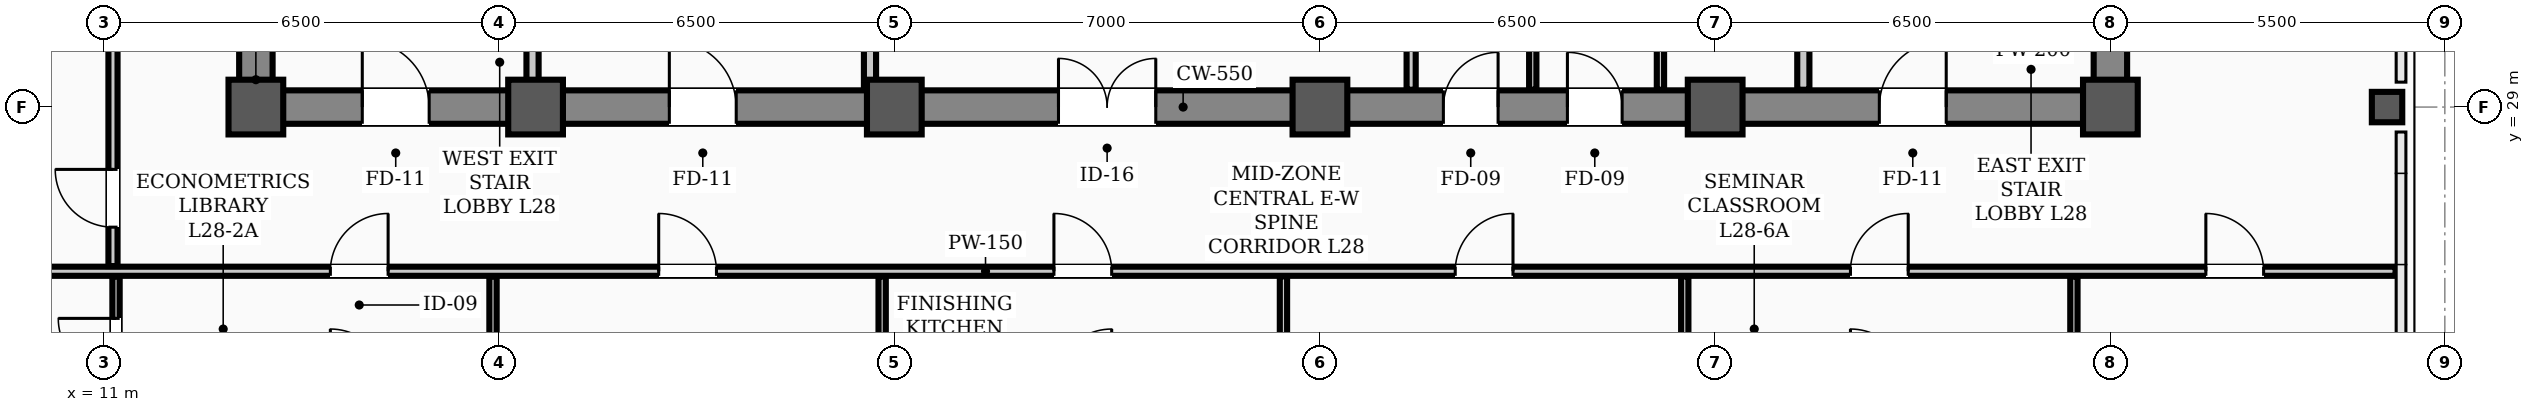
"""IFC4 building model, lengths in metres.
Left out: names, types, materials, properties, quantities, classifications, styles, units other than length and angle.
Written with IfcOpenShell. Run it as: python <this file> out.ifc"""

import sys

from ifc_helpers import new_model, si_unit, direction, frame, frame_2d, origin, origin_2d, place, context, subcontext, project, spatial, rectangle, hollow_rectangle, extrude, element, fill, save


model = new_model("IFC4")
c1 = context("Model", 3, precision=1e-05, world=origin(), true_north=direction((0.0, 1.0)))
c2 = subcontext(c1, "Body", "Model", "MODEL_VIEW")
j1 = project(units=[si_unit("LENGTHUNIT", "METRE"), si_unit("PLANEANGLEUNIT", "RADIAN")], contexts=[c1])
p1 = place(None, origin())
s1 = spatial("IfcSite", under=j1, at=p1, CompositionType="ELEMENT")
p2 = place(p1, origin())
s2 = spatial("IfcBuilding", under=s1, at=p2, CompositionType="ELEMENT")
p3 = place(p2, frame((0.0, 0.0, 114.9)))
s3 = spatial("IfcBuildingStorey", under=s2, at=p3, CompositionType="ELEMENT", Elevation=114.9)
for number, where, z_axis, x_axis in (
    (1, (13.5, 29.0, 0.0), (0.0, 0.0, 1.0), (1.0, 0.0, 0.0)),
    (2, (18.1, 29.0, 0.0), (0.0, 0.0, 1.0), (1.0, 0.0, 0.0)),
    (3, (24.0, 29.0, 0.0), (0.0, 0.0, 1.0), (1.0, 0.0, 0.0)),
    (4, (31.0, 29.0, 0.0), (0.0, 0.0, 1.0), (1.0, 0.0, 0.0)),
    (5, (37.5, 29.0, 0.0), (0.0, 0.0, 1.0), (1.0, 0.0, 0.0)),
    (6, (44.0, 29.0, 0.0), (0.0, 0.0, 1.0), (1.0, 0.0, 0.0)),
):
    element("IfcColumn", number, at=place(p3, frame(where, z_axis=z_axis, x_axis=x_axis)), inside=s3, PredefinedType="COLUMN", context=c2, shape_type="SweptSolid", body=[
        extrude(hollow_rectangle(XDim=0.9, YDim=0.9, WallThickness=0.035, InnerFilletRadius=0.017, OuterFilletRadius=0.052, at=origin_2d()), origin(), (0.0, 0.0, 1.0), 3.9),
    ])
p4 = place(p3, frame((48.55, 29.0, 0.0), z_axis=(0.0, 0.0, 1.0), x_axis=(1.0, 0.0, 0.0)))
e7 = element("IfcColumn", 7, at=p4, inside=s3, PredefinedType="COLUMN", context=c2, shape_type="SweptSolid", body=[
    extrude(hollow_rectangle(XDim=0.5, YDim=0.5, WallThickness=0.024, InnerFilletRadius=0.012, OuterFilletRadius=0.036, at=origin_2d()), origin(), (0.0, 0.0, 1.0), 3.9),
])
p5 = place(p3, frame((13.5, 29.0, 0.0), z_axis=(0.0, 0.0, 1.0), x_axis=(1.0, 0.0, 0.0)))
e8 = element("IfcWall", 8, at=p5, inside=s3, PredefinedType="SHEAR", context=c2, shape_type="SweptSolid", body=[
    extrude(rectangle(XDim=30.5, YDim=0.55, at=frame_2d((15.25, 0.0))), origin(), (0.0, 0.0, 1.0), 3.72),
])
p6 = place(p5, frame((1.75, 0.0, 0.0)))
e9 = element("IfcOpeningElement", 9, at=p6, cuts=e8, PredefinedType="OPENING", context=c2, shape_type="SweptSolid", body=[
    extrude(rectangle(XDim=1.1, YDim=2.08, at=frame_2d((0.55, 1.04))), frame((0.0, 0.285, 0.0), z_axis=(0.0, -1.0, 0.0), x_axis=(1.0, 0.0, 0.0)), (0.0, 0.0, 1.0), 0.57),
])
p7 = place(p5, frame((26.7, 0.0, 0.0)))
e10 = element("IfcOpeningElement", 10, at=p7, cuts=e8, PredefinedType="OPENING", context=c2, shape_type="SweptSolid", body=[
    extrude(rectangle(XDim=1.1, YDim=2.08, at=frame_2d((0.55, 1.04))), frame((0.0, 0.285, 0.0), z_axis=(0.0, -1.0, 0.0), x_axis=(1.0, 0.0, 0.0)), (0.0, 0.0, 1.0), 0.57),
])
p8 = place(p5, frame((6.8, 0.0, 0.0)))
e11 = element("IfcOpeningElement", 11, at=p8, cuts=e8, PredefinedType="OPENING", context=c2, shape_type="SweptSolid", body=[
    extrude(rectangle(XDim=1.1, YDim=2.08, at=frame_2d((0.55, 1.04))), frame((0.0, 0.285, 0.0), z_axis=(0.0, -1.0, 0.0), x_axis=(1.0, 0.0, 0.0)), (0.0, 0.0, 1.0), 0.57),
])
p9 = place(p5, frame((13.2, 0.0, 0.0)))
e12 = element("IfcOpeningElement", 12, at=p9, cuts=e8, PredefinedType="OPENING", context=c2, shape_type="SweptSolid", body=[
    extrude(rectangle(XDim=1.6, YDim=2.08, at=frame_2d((0.8, 1.04))), frame((0.0, 0.285, 0.0), z_axis=(0.0, -1.0, 0.0), x_axis=(1.0, 0.0, 0.0)), (0.0, 0.0, 1.0), 0.57),
])
p10 = place(p5, frame((19.53, 0.0, 0.0)))
e13 = element("IfcOpeningElement", 13, at=p10, cuts=e8, PredefinedType="OPENING", context=c2, shape_type="SweptSolid", body=[
    extrude(rectangle(XDim=0.9, YDim=2.08, at=frame_2d((0.45, 1.04))), frame((0.0, 0.285, 0.0), z_axis=(0.0, -1.0, 0.0), x_axis=(1.0, 0.0, 0.0)), (0.0, 0.0, 1.0), 0.57),
])
p11 = place(p5, frame((21.57, 0.0, 0.0)))
e14 = element("IfcOpeningElement", 14, at=p11, cuts=e8, PredefinedType="OPENING", context=c2, shape_type="SweptSolid", body=[
    extrude(rectangle(XDim=0.9, YDim=2.08, at=frame_2d((0.45, 1.04))), frame((0.0, 0.285, 0.0), z_axis=(0.0, -1.0, 0.0), x_axis=(1.0, 0.0, 0.0)), (0.0, 0.0, 1.0), 0.57),
])
for number, where, z_axis, x_axis in (
    (15, (13.5, 29.35, 0.0), (0.0, 0.0, 1.0), (0.0, 1.0, 0.0)),
    (16, (44.0, 29.35, 0.0), (0.0, 0.0, 1.0), (0.0, 1.0, 0.0)),
):
    element("IfcWall", number, at=place(p3, frame(where, z_axis=z_axis, x_axis=x_axis)), inside=s3, PredefinedType="SHEAR", context=c2, shape_type="SweptSolid", body=[
        extrude(rectangle(XDim=8.6, YDim=0.55, at=frame_2d((4.3, 0.0))), origin(), (0.0, 0.0, 1.0), 3.72),
    ])
p12 = place(p3, frame((2.31, 26.3, 0.0), z_axis=(0.0, 0.0, 1.0), x_axis=(1.0, 0.0, 0.0)))
e17 = element("IfcWall", 17, at=p12, inside=s3, PredefinedType="PARTITIONING", context=c2, shape_type="SweptSolid", body=[
    extrude(rectangle(XDim=46.38, YDim=0.15, at=frame_2d((23.19, 0.0))), origin(), (0.0, 0.0, 1.0), 3.1),
])
p13 = place(p12, frame((12.415, 0.0, 0.0)))
e18 = element("IfcOpeningElement", 18, at=p13, cuts=e17, PredefinedType="OPENING", context=c2, shape_type="SweptSolid", body=[
    extrude(rectangle(XDim=0.95, YDim=2.08, at=frame_2d((0.475, 1.04))), frame((0.0, 0.085, 0.0), z_axis=(0.0, -1.0, 0.0), x_axis=(1.0, 0.0, 0.0)), (0.0, 0.0, 1.0), 0.17),
])
p14 = place(p12, frame((17.815, 0.0, 0.0)))
e19 = element("IfcOpeningElement", 19, at=p14, cuts=e17, PredefinedType="OPENING", context=c2, shape_type="SweptSolid", body=[
    extrude(rectangle(XDim=0.95, YDim=2.08, at=frame_2d((0.475, 1.04))), frame((0.0, 0.085, 0.0), z_axis=(0.0, -1.0, 0.0), x_axis=(1.0, 0.0, 0.0)), (0.0, 0.0, 1.0), 0.17),
])
p15 = place(p12, frame((24.315, 0.0, 0.0)))
e20 = element("IfcOpeningElement", 20, at=p15, cuts=e17, PredefinedType="OPENING", context=c2, shape_type="SweptSolid", body=[
    extrude(rectangle(XDim=0.95, YDim=2.08, at=frame_2d((0.475, 1.04))), frame((0.0, 0.085, 0.0), z_axis=(0.0, -1.0, 0.0), x_axis=(1.0, 0.0, 0.0)), (0.0, 0.0, 1.0), 0.17),
])
p16 = place(p12, frame((30.915, 0.0, 0.0)))
e21 = element("IfcOpeningElement", 21, at=p16, cuts=e17, PredefinedType="OPENING", context=c2, shape_type="SweptSolid", body=[
    extrude(rectangle(XDim=0.95, YDim=2.08, at=frame_2d((0.475, 1.04))), frame((0.0, 0.085, 0.0), z_axis=(0.0, -1.0, 0.0), x_axis=(1.0, 0.0, 0.0)), (0.0, 0.0, 1.0), 0.17),
])
p17 = place(p12, frame((37.415, 0.0, 0.0)))
e22 = element("IfcOpeningElement", 22, at=p17, cuts=e17, PredefinedType="OPENING", context=c2, shape_type="SweptSolid", body=[
    extrude(rectangle(XDim=0.95, YDim=2.08, at=frame_2d((0.475, 1.04))), frame((0.0, 0.085, 0.0), z_axis=(0.0, -1.0, 0.0), x_axis=(1.0, 0.0, 0.0)), (0.0, 0.0, 1.0), 0.17),
])
p18 = place(p12, frame((43.26, 0.0, 0.0)))
e23 = element("IfcOpeningElement", 23, at=p18, cuts=e17, PredefinedType="OPENING", context=c2, shape_type="SweptSolid", body=[
    extrude(rectangle(XDim=0.95, YDim=2.08, at=frame_2d((0.475, 1.04))), frame((0.0, 0.085, 0.0), z_axis=(0.0, -1.0, 0.0), x_axis=(1.0, 0.0, 0.0)), (0.0, 0.0, 1.0), 0.17),
])
for number, where, z_axis, x_axis in (
    (24, (18.05, 29.285, 0.0), (0.0, 0.0, 1.0), (0.0, 1.0, 0.0)),
    (25, (38.95, 29.285, 0.0), (0.0, 0.0, 1.0), (0.0, 1.0, 0.0)),
):
    element("IfcWall", number, at=place(p3, frame(where, z_axis=z_axis, x_axis=x_axis)), inside=s3, PredefinedType="STANDARD", context=c2, shape_type="SweptSolid", body=[
        extrude(rectangle(XDim=1.015, YDim=0.2, at=frame_2d((0.508, 0.0))), origin(), (0.0, 0.0, 1.0), 3.3),
    ])
p19 = place(p3, frame((23.6, 29.285, 0.0), z_axis=(0.0, 0.0, 1.0), x_axis=(0.0, 1.0, 0.0)))
e26 = element("IfcWall", 26, at=p19, inside=s3, PredefinedType="STANDARD", context=c2, shape_type="SweptSolid", body=[
    extrude(rectangle(XDim=5.415, YDim=0.2, at=frame_2d((2.708, 0.0))), origin(), (0.0, 0.0, 1.0), 3.1),
])
p20 = place(p3, frame((32.5, 29.285, 0.0), z_axis=(0.0, 0.0, 1.0), x_axis=(0.0, 1.0, 0.0)))
e27 = element("IfcWall", 27, at=p20, inside=s3, PredefinedType="PARTITIONING", context=c2, shape_type="SweptSolid", body=[
    extrude(rectangle(XDim=2.48, YDim=0.15, at=frame_2d((1.24, 0.0))), origin(), (0.0, 0.0, 1.0), 3.3),
])
for number, where, z_axis, x_axis in (
    (28, (36.6, 29.285, 0.0), (0.0, 0.0, 1.0), (0.0, 1.0, 0.0)),
    (29, (34.5, 29.285, 0.0), (0.0, 0.0, 1.0), (0.0, 1.0, 0.0)),
):
    element("IfcWall", number, at=place(p3, frame(where, z_axis=z_axis, x_axis=x_axis)), inside=s3, PredefinedType="PARTITIONING", context=c2, shape_type="SweptSolid", body=[
        extrude(rectangle(XDim=2.48, YDim=0.12, at=frame_2d((1.24, 0.0))), origin(), (0.0, 0.0, 1.0), 3.3),
    ])
p21 = place(p3, frame((11.15, 26.385, 0.0), z_axis=(0.0, 0.0, 1.0), x_axis=(0.0, 1.0, 0.0)))
e30 = element("IfcWall", 30, at=p21, inside=s3, PredefinedType="PARTITIONING", context=c2, shape_type="SweptSolid", body=[
    extrude(rectangle(XDim=11.28, YDim=0.15, at=frame_2d((5.64, 0.0))), origin(), (0.0, 0.0, 1.0), 3.0),
])
p22 = place(p21, frame((0.64, 0.0, 0.0)))
e31 = element("IfcOpeningElement", 31, at=p22, cuts=e30, PredefinedType="OPENING", context=c2, shape_type="SweptSolid", body=[
    extrude(rectangle(XDim=0.95, YDim=2.08, at=frame_2d((0.475, 1.04))), frame((0.0, 0.085, 0.0), z_axis=(0.0, -1.0, 0.0), x_axis=(1.0, 0.0, 0.0)), (0.0, 0.0, 1.0), 0.17),
])
p23 = place(p21, frame((8.015, 0.0, 0.0)))
e32 = element("IfcOpeningElement", 32, at=p23, cuts=e30, PredefinedType="OPENING", context=c2, shape_type="SweptSolid", body=[
    extrude(rectangle(XDim=0.95, YDim=2.08, at=frame_2d((0.475, 1.04))), frame((0.0, 0.085, 0.0), z_axis=(0.0, -1.0, 0.0), x_axis=(1.0, 0.0, 0.0)), (0.0, 0.0, 1.0), 0.17),
])
p24 = place(p3, frame((11.2, 10.81, 0.0), z_axis=(0.0, 0.0, 1.0), x_axis=(0.0, 1.0, 0.0)))
e33 = element("IfcWall", 33, at=p24, inside=s3, PredefinedType="PARTITIONING", context=c2, shape_type="SweptSolid", body=[
    extrude(rectangle(XDim=15.405, YDim=0.12, at=frame_2d((7.703, 0.0))), origin(), (0.0, 0.0, 1.0), 3.0),
])
p25 = place(p24, frame((13.765, 0.0, 0.0)))
e34 = element("IfcOpeningElement", 34, at=p25, cuts=e33, PredefinedType="OPENING", context=c2, shape_type="SweptSolid", body=[
    extrude(rectangle(XDim=0.95, YDim=2.08, at=frame_2d((0.475, 1.04))), frame((0.0, 0.07, 0.0), z_axis=(0.0, -1.0, 0.0), x_axis=(1.0, 0.0, 0.0)), (0.0, 0.0, 1.0), 0.14),
])
p26 = place(p3, frame((17.4, 10.81, 0.0), z_axis=(0.0, 0.0, 1.0), x_axis=(0.0, 1.0, 0.0)))
e35 = element("IfcWall", 35, at=p26, inside=s3, PredefinedType="PARTITIONING", context=c2, shape_type="SweptSolid", body=[
    extrude(rectangle(XDim=15.405, YDim=0.12, at=frame_2d((7.703, 0.0))), origin(), (0.0, 0.0, 1.0), 3.0),
])
p27 = place(p3, frame((23.8, 12.57, 0.0), z_axis=(0.0, 0.0, 1.0), x_axis=(0.0, 1.0, 0.0)))
e36 = element("IfcWall", 36, at=p27, inside=s3, PredefinedType="PARTITIONING", context=c2, shape_type="SweptSolid", body=[
    extrude(rectangle(XDim=13.645, YDim=0.12, at=frame_2d((6.823, 0.0))), origin(), (0.0, 0.0, 1.0), 3.0),
])
for number, where, z_axis, x_axis in (
    (37, (30.4, 10.81, 0.0), (0.0, 0.0, 1.0), (0.0, 1.0, 0.0)),
    (38, (37.0, 10.81, 0.0), (0.0, 0.0, 1.0), (0.0, 1.0, 0.0)),
    (39, (43.4, 10.81, 0.0), (0.0, 0.0, 1.0), (0.0, 1.0, 0.0)),
):
    element("IfcWall", number, at=place(p3, frame(where, z_axis=z_axis, x_axis=x_axis)), inside=s3, PredefinedType="PARTITIONING", context=c2, shape_type="SweptSolid", body=[
        extrude(rectangle(XDim=15.405, YDim=0.12, at=frame_2d((7.703, 0.0))), origin(), (0.0, 0.0, 1.0), 3.0),
    ])
p28 = place(p6, origin())
e40 = element("IfcDoor", 40, at=p28, inside=s3, OperationType="SINGLE_SWING_LEFT", PredefinedType="DOOR", context=c2, shape_type="SweptSolid", body=[
    extrude(rectangle(XDim=1.1, YDim=2.08, at=frame_2d((0.55, 1.04))), frame((0.0, 0.025, 0.0), z_axis=(0.0, -1.0, 0.0), x_axis=(1.0, 0.0, 0.0)), (0.0, 0.0, 1.0), 0.05),
])
fill(e9, e40)
p29 = place(p7, origin())
e41 = element("IfcDoor", 41, at=p29, inside=s3, OperationType="SINGLE_SWING_RIGHT", PredefinedType="DOOR", context=c2, shape_type="SweptSolid", body=[
    extrude(rectangle(XDim=1.1, YDim=2.08, at=frame_2d((0.55, 1.04))), frame((0.0, 0.025, 0.0), z_axis=(0.0, -1.0, 0.0), x_axis=(1.0, 0.0, 0.0)), (0.0, 0.0, 1.0), 0.05),
])
fill(e10, e41)
p30 = place(p8, origin())
e42 = element("IfcDoor", 42, at=p30, inside=s3, OperationType="SINGLE_SWING_LEFT", PredefinedType="DOOR", context=c2, shape_type="SweptSolid", body=[
    extrude(rectangle(XDim=1.1, YDim=2.08, at=frame_2d((0.55, 1.04))), frame((0.0, 0.025, 0.0), z_axis=(0.0, -1.0, 0.0), x_axis=(1.0, 0.0, 0.0)), (0.0, 0.0, 1.0), 0.05),
])
fill(e11, e42)
p31 = place(p9, origin())
e43 = element("IfcDoor", 43, at=p31, inside=s3, OperationType="DOUBLE_DOOR_SINGLE_SWING", PredefinedType="DOOR", context=c2, shape_type="SweptSolid", body=[
    extrude(rectangle(XDim=1.6, YDim=2.08, at=frame_2d((0.8, 1.04))), frame((0.0, 0.025, 0.0), z_axis=(0.0, -1.0, 0.0), x_axis=(1.0, 0.0, 0.0)), (0.0, 0.0, 1.0), 0.05),
])
fill(e12, e43)
p32 = place(p10, origin())
e44 = element("IfcDoor", 44, at=p32, inside=s3, OperationType="SINGLE_SWING_RIGHT", PredefinedType="DOOR", context=c2, shape_type="SweptSolid", body=[
    extrude(rectangle(XDim=0.9, YDim=2.08, at=frame_2d((0.45, 1.04))), frame((0.0, 0.025, 0.0), z_axis=(0.0, -1.0, 0.0), x_axis=(1.0, 0.0, 0.0)), (0.0, 0.0, 1.0), 0.05),
])
fill(e13, e44)
p33 = place(p11, origin())
e45 = element("IfcDoor", 45, at=p33, inside=s3, OperationType="SINGLE_SWING_LEFT", PredefinedType="DOOR", context=c2, shape_type="SweptSolid", body=[
    extrude(rectangle(XDim=0.9, YDim=2.08, at=frame_2d((0.45, 1.04))), frame((0.0, 0.025, 0.0), z_axis=(0.0, -1.0, 0.0), x_axis=(1.0, 0.0, 0.0)), (0.0, 0.0, 1.0), 0.05),
])
fill(e14, e45)
p34 = place(p25, origin())
e46 = element("IfcDoor", 46, at=p34, inside=s3, OperationType="SINGLE_SWING_RIGHT", PredefinedType="DOOR", context=c2, shape_type="SweptSolid", body=[
    extrude(rectangle(XDim=0.95, YDim=2.08, at=frame_2d((0.475, 1.04))), frame((0.0, 0.025, 0.0), z_axis=(0.0, -1.0, 0.0), x_axis=(1.0, 0.0, 0.0)), (0.0, 0.0, 1.0), 0.05),
])
fill(e34, e46)
p35 = place(p13, origin())
e47 = element("IfcDoor", 47, at=p35, inside=s3, OperationType="SINGLE_SWING_RIGHT", PredefinedType="DOOR", context=c2, shape_type="SweptSolid", body=[
    extrude(rectangle(XDim=0.95, YDim=2.08, at=frame_2d((0.475, 1.04))), frame((0.0, 0.025, 0.0), z_axis=(0.0, -1.0, 0.0), x_axis=(1.0, 0.0, 0.0)), (0.0, 0.0, 1.0), 0.05),
])
fill(e18, e47)
p36 = place(p14, origin())
e48 = element("IfcDoor", 48, at=p36, inside=s3, OperationType="SINGLE_SWING_LEFT", PredefinedType="DOOR", context=c2, shape_type="SweptSolid", body=[
    extrude(rectangle(XDim=0.95, YDim=2.08, at=frame_2d((0.475, 1.04))), frame((0.0, 0.025, 0.0), z_axis=(0.0, -1.0, 0.0), x_axis=(1.0, 0.0, 0.0)), (0.0, 0.0, 1.0), 0.05),
])
fill(e19, e48)
p37 = place(p15, origin())
e49 = element("IfcDoor", 49, at=p37, inside=s3, OperationType="SINGLE_SWING_LEFT", PredefinedType="DOOR", context=c2, shape_type="SweptSolid", body=[
    extrude(rectangle(XDim=0.95, YDim=2.08, at=frame_2d((0.475, 1.04))), frame((0.0, 0.025, 0.0), z_axis=(0.0, -1.0, 0.0), x_axis=(1.0, 0.0, 0.0)), (0.0, 0.0, 1.0), 0.05),
])
fill(e20, e49)
p38 = place(p16, origin())
e50 = element("IfcDoor", 50, at=p38, inside=s3, OperationType="SINGLE_SWING_RIGHT", PredefinedType="DOOR", context=c2, shape_type="SweptSolid", body=[
    extrude(rectangle(XDim=0.95, YDim=2.08, at=frame_2d((0.475, 1.04))), frame((0.0, 0.025, 0.0), z_axis=(0.0, -1.0, 0.0), x_axis=(1.0, 0.0, 0.0)), (0.0, 0.0, 1.0), 0.05),
])
fill(e21, e50)
p39 = place(p17, origin())
e51 = element("IfcDoor", 51, at=p39, inside=s3, OperationType="SINGLE_SWING_RIGHT", PredefinedType="DOOR", context=c2, shape_type="SweptSolid", body=[
    extrude(rectangle(XDim=0.95, YDim=2.08, at=frame_2d((0.475, 1.04))), frame((0.0, 0.025, 0.0), z_axis=(0.0, -1.0, 0.0), x_axis=(1.0, 0.0, 0.0)), (0.0, 0.0, 1.0), 0.05),
])
fill(e22, e51)
p40 = place(p18, origin())
e52 = element("IfcDoor", 52, at=p40, inside=s3, OperationType="SINGLE_SWING_LEFT", PredefinedType="DOOR", context=c2, shape_type="SweptSolid", body=[
    extrude(rectangle(XDim=0.95, YDim=2.08, at=frame_2d((0.475, 1.04))), frame((0.0, 0.025, 0.0), z_axis=(0.0, -1.0, 0.0), x_axis=(1.0, 0.0, 0.0)), (0.0, 0.0, 1.0), 0.05),
])
fill(e23, e52)
p41 = place(p22, origin())
e53 = element("IfcDoor", 53, at=p41, inside=s3, OperationType="SINGLE_SWING_RIGHT", PredefinedType="DOOR", context=c2, shape_type="SweptSolid", body=[
    extrude(rectangle(XDim=0.95, YDim=2.08, at=frame_2d((0.475, 1.04))), frame((0.0, 0.025, 0.0), z_axis=(0.0, -1.0, 0.0), x_axis=(1.0, 0.0, 0.0)), (0.0, 0.0, 1.0), 0.05),
])
fill(e31, e53)
save(model, sys.argv[1])
